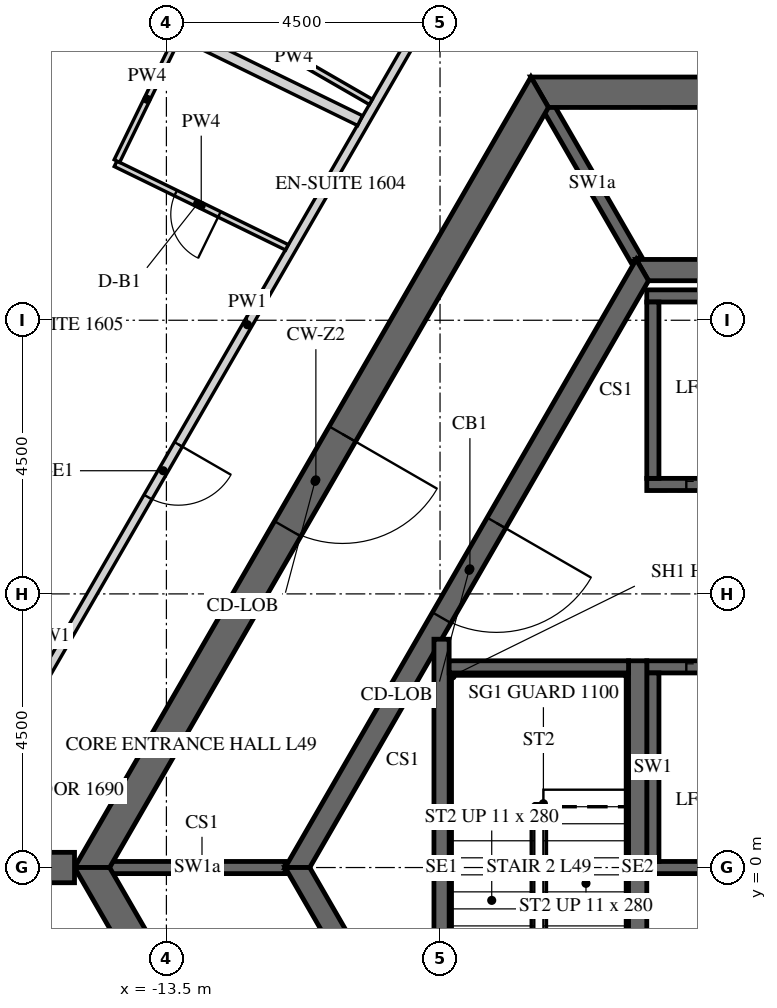
"""IFC4 building model, lengths in metres.
Left out: names, types, materials, properties, quantities, classifications, styles, units other than length and angle.
Written with IfcOpenShell. Run it as: python <this file> out.ifc"""

import sys

from ifc_helpers import new_model, si_unit, direction, frame, frame_2d, origin, place, context, subcontext, project, spatial, polyline, rectangle, outline, extrude, element, fill, save


model = new_model("IFC4")
c1 = context("Model", 3, precision=1e-05, world=origin(), true_north=direction((0.0, 1.0)))
c2 = subcontext(c1, "Body", "Model", "MODEL_VIEW")
j1 = project(units=[si_unit("LENGTHUNIT", "METRE"), si_unit("PLANEANGLEUNIT", "RADIAN")], contexts=[c1])
p1 = place(None, origin())
s1 = spatial("IfcSite", under=j1, at=p1, CompositionType="ELEMENT")
p2 = place(p1, origin())
s2 = spatial("IfcBuilding", under=s1, at=p2, CompositionType="ELEMENT")
p3 = place(p2, frame((0.0, 0.0, 207.3)))
s3 = spatial("IfcBuildingStorey", under=s2, at=p3, CompositionType="ELEMENT", Elevation=207.3)
p4 = place(p3, frame((-7.361, 12.75, -0.15), z_axis=(0.0, 0.0, 1.0), x_axis=(-0.50000571537, -0.866022103989, 0.0)))
e1 = element("IfcWall", 1, at=p4, inside=s3, PredefinedType="SHEAR", context=c2, shape_type="SweptSolid", body=[
    extrude(outline(polyline([(-0.144, -0.25), (14.867, -0.25), (14.578, 0.25), (0.144, 0.25), (-0.144, -0.25)])), origin(), (0.0, 0.0, 1.0), 3.9),
])
p5 = place(p4, frame((6.49, 0.0, 0.15)))
e2 = element("IfcOpeningElement", 2, at=p5, cuts=e1, PredefinedType="OPENING", context=c2, shape_type="SweptSolid", body=[
    extrude(rectangle(XDim=1.8, YDim=2.4, at=frame_2d((0.9, 1.2))), frame((0.0, 0.26, 0.0), z_axis=(0.0, -1.0, 0.0), x_axis=(1.0, 0.0, 0.0)), (0.0, 0.0, 1.0), 0.52),
])
p6 = place(p3, frame((-14.722, 0.0, -0.15), z_axis=(0.0, 0.0, 1.0), x_axis=(0.50000571537, -0.866022103989, 0.0)))
e3 = element("IfcWall", 3, at=p6, inside=s3, PredefinedType="SHEAR", context=c2, shape_type="SweptSolid", body=[
    extrude(outline(polyline([(-0.144, -0.25), (14.867, -0.25), (14.578, 0.25), (0.144, 0.25), (-0.144, -0.25)])), origin(), (0.0, 0.0, 1.0), 3.9),
])
p7 = place(p6, frame((6.432, 0.0, 0.15)))
e4 = element("IfcOpeningElement", 4, at=p7, cuts=e3, PredefinedType="OPENING", context=c2, shape_type="SweptSolid", body=[
    extrude(rectangle(XDim=1.8, YDim=2.4, at=frame_2d((0.9, 1.2))), frame((0.0, 0.26, 0.0), z_axis=(0.0, -1.0, 0.0), x_axis=(1.0, 0.0, 0.0)), (0.0, 0.0, 1.0), 0.52),
])
p8 = place(p3, frame((7.361, 12.75, -0.15), z_axis=(0.0, 0.0, 1.0), x_axis=(-1.0, 0.0, 0.0)))
e5 = element("IfcWall", 5, at=p8, inside=s3, PredefinedType="SHEAR", context=c2, shape_type="SweptSolid", body=[
    extrude(outline(polyline([(-0.144, -0.25), (14.866, -0.25), (14.578, 0.25), (0.144, 0.25), (-0.144, -0.25)])), origin(), (0.0, 0.0, 1.0), 3.9),
])
p9 = place(p8, frame((6.761, 0.0, 0.15)))
e6 = element("IfcOpeningElement", 6, at=p9, cuts=e5, PredefinedType="OPENING", context=c2, shape_type="SweptSolid", body=[
    extrude(rectangle(XDim=1.2, YDim=2.4, at=frame_2d((0.6, 1.2))), frame((0.0, 0.26, 0.0), z_axis=(0.0, -1.0, 0.0), x_axis=(1.0, 0.0, 0.0)), (0.0, 0.0, 1.0), 0.52),
])
p10 = place(p3, frame((-15.011, 0.0, -0.15), z_axis=(0.0, 0.0, 1.0), x_axis=(-1.0, 0.0, 0.0)))
e7 = element("IfcWall", 7, at=p10, inside=s3, PredefinedType="SHEAR", context=c2, shape_type="SweptSolid", body=[
    extrude(rectangle(XDim=15.424, YDim=0.5, at=frame_2d((7.712, 0.0))), origin(), (0.0, 0.0, 1.0), 3.9),
])
p11 = place(p10, frame((6.812, 0.0, 0.15)))
e8 = element("IfcOpeningElement", 8, at=p11, cuts=e7, PredefinedType="OPENING", context=c2, shape_type="SweptSolid", body=[
    extrude(rectangle(XDim=1.8, YDim=2.4, at=frame_2d((0.9, 1.2))), frame((0.0, 0.26, 0.0), z_axis=(0.0, -1.0, 0.0), x_axis=(1.0, 0.0, 0.0)), (0.0, 0.0, 1.0), 0.52),
])
p12 = place(p3, frame((-5.673, 9.825, -0.15), z_axis=(0.0, 0.0, 1.0), x_axis=(-0.499995046907, -0.866028263435, 0.0)))
e9 = element("IfcWall", 9, at=p12, inside=s3, PredefinedType="SHEAR", context=c2, shape_type="SweptSolid", body=[
    extrude(outline(polyline([(-0.101, -0.175), (11.446, -0.175), (11.244, 0.175), (0.101, 0.175), (-0.101, -0.175)])), origin(), (0.0, 0.0, 1.0), 3.9),
])
p13 = place(p12, frame((4.801, 0.0, 0.15)))
e10 = element("IfcOpeningElement", 10, at=p13, cuts=e9, PredefinedType="OPENING", context=c2, shape_type="SweptSolid", body=[
    extrude(rectangle(XDim=1.8, YDim=2.4, at=frame_2d((0.9, 1.2))), frame((0.0, 0.185, 0.0), z_axis=(0.0, -1.0, 0.0), x_axis=(1.0, 0.0, 0.0)), (0.0, 0.0, 1.0), 0.37),
])
p14 = place(p3, frame((-11.345, 0.0, -0.15), z_axis=(0.0, 0.0, 1.0), x_axis=(0.499995046907, -0.866028263435, 0.0)))
e11 = element("IfcWall", 11, at=p14, inside=s3, PredefinedType="SHEAR", context=c2, shape_type="SweptSolid", body=[
    extrude(outline(polyline([(-0.101, -0.175), (11.446, -0.175), (11.244, 0.175), (0.101, 0.175), (-0.101, -0.175)])), origin(), (0.0, 0.0, 1.0), 3.9),
])
p15 = place(p14, frame((4.744, 0.0, 0.15)))
e12 = element("IfcOpeningElement", 12, at=p15, cuts=e11, PredefinedType="OPENING", context=c2, shape_type="SweptSolid", body=[
    extrude(rectangle(XDim=1.8, YDim=2.4, at=frame_2d((0.9, 1.2))), frame((0.0, 0.185, 0.0), z_axis=(0.0, -1.0, 0.0), x_axis=(1.0, 0.0, 0.0)), (0.0, 0.0, 1.0), 0.37),
])
p16 = place(p3, frame((5.673, 9.825, -0.15), z_axis=(0.0, 0.0, 1.0), x_axis=(-1.0, 0.0, 0.0)))
e13 = element("IfcWall", 13, at=p16, inside=s3, PredefinedType="SHEAR", context=c2, shape_type="SweptSolid", body=[
    extrude(outline(polyline([(-0.101, -0.175), (11.446, -0.175), (11.244, 0.175), (0.101, 0.175), (-0.101, -0.175)])), origin(), (0.0, 0.0, 1.0), 3.9),
])
p17 = place(p3, frame((-5.6, 6.3, -0.25), z_axis=(0.0, 0.0, 1.0), x_axis=(1.0, 0.0, 0.0)))
e14 = element("IfcWall", 14, at=p17, inside=s3, PredefinedType="SHEAR", context=c2, shape_type="SweptSolid", body=[
    extrude(rectangle(XDim=11.2, YDim=0.2, at=frame_2d((5.6, 0.0))), origin(), (0.0, 0.0, 1.0), 3.9),
])
p18 = place(p17, frame((8.45, 0.0, 0.25)))
e15 = element("IfcOpeningElement", 15, at=p18, cuts=e14, PredefinedType="OPENING", context=c2, shape_type="SweptSolid", body=[
    extrude(rectangle(XDim=0.9, YDim=2.1, at=frame_2d((0.45, 1.05))), frame((0.0, 0.11, 0.0), z_axis=(0.0, -1.0, 0.0), x_axis=(1.0, 0.0, 0.0)), (0.0, 0.0, 1.0), 0.22),
])
p19 = place(p17, frame((0.65, 0.0, 0.25)))
e16 = element("IfcOpeningElement", 16, at=p19, cuts=e14, PredefinedType="OPENING", context=c2, shape_type="SweptSolid", body=[
    extrude(rectangle(XDim=1.1, YDim=2.1, at=frame_2d((0.55, 1.05))), frame((0.0, 0.11, 0.0), z_axis=(0.0, -1.0, 0.0), x_axis=(1.0, 0.0, 0.0)), (0.0, 0.0, 1.0), 0.22),
])
p20 = place(p17, frame((2.85, 0.0, 0.25)))
e17 = element("IfcOpeningElement", 17, at=p20, cuts=e14, PredefinedType="OPENING", context=c2, shape_type="SweptSolid", body=[
    extrude(rectangle(XDim=1.1, YDim=2.1, at=frame_2d((0.55, 1.05))), frame((0.0, 0.11, 0.0), z_axis=(0.0, -1.0, 0.0), x_axis=(1.0, 0.0, 0.0)), (0.0, 0.0, 1.0), 0.22),
])
p21 = place(p17, frame((5.05, 0.0, 0.25)))
e18 = element("IfcOpeningElement", 18, at=p21, cuts=e14, PredefinedType="OPENING", context=c2, shape_type="SweptSolid", body=[
    extrude(rectangle(XDim=1.1, YDim=2.1, at=frame_2d((0.55, 1.05))), frame((0.0, 0.11, 0.0), z_axis=(0.0, -1.0, 0.0), x_axis=(1.0, 0.0, 0.0)), (0.0, 0.0, 1.0), 0.22),
])
p22 = place(p3, frame((-5.6, 9.4, -0.25), z_axis=(0.0, 0.0, 1.0), x_axis=(1.0, 0.0, 0.0)))
e19 = element("IfcWall", 19, at=p22, inside=s3, PredefinedType="SHEAR", context=c2, shape_type="SweptSolid", body=[
    extrude(rectangle(XDim=11.2, YDim=0.2, at=frame_2d((5.6, 0.0))), origin(), (0.0, 0.0, 1.0), 3.9),
])
p23 = place(p3, frame((-5.5, 6.4, -0.25), z_axis=(0.0, 0.0, 1.0), x_axis=(0.0, 1.0, 0.0)))
e20 = element("IfcWall", 20, at=p23, inside=s3, PredefinedType="SHEAR", context=c2, shape_type="SweptSolid", body=[
    extrude(rectangle(XDim=2.9, YDim=0.2, at=frame_2d((1.45, 0.0))), origin(), (0.0, 0.0, 1.0), 3.9),
])
p24 = place(p3, frame((-5.6, 3.3, -0.25), z_axis=(0.0, 0.0, 1.0), x_axis=(1.0, 0.0, 0.0)))
e21 = element("IfcWall", 21, at=p24, inside=s3, PredefinedType="SHEAR", context=c2, shape_type="SweptSolid", body=[
    extrude(rectangle(XDim=11.2, YDim=0.2, at=frame_2d((5.6, 0.0))), origin(), (0.0, 0.0, 1.0), 3.9),
])
p25 = place(p24, frame((0.65, 0.0, 0.25)))
e22 = element("IfcOpeningElement", 22, at=p25, cuts=e21, PredefinedType="OPENING", context=c2, shape_type="SweptSolid", body=[
    extrude(rectangle(XDim=1.1, YDim=2.1, at=frame_2d((0.55, 1.05))), frame((0.0, 0.11, 0.0), z_axis=(0.0, -1.0, 0.0), x_axis=(1.0, 0.0, 0.0)), (0.0, 0.0, 1.0), 0.22),
])
p26 = place(p24, frame((2.85, 0.0, 0.25)))
e23 = element("IfcOpeningElement", 23, at=p26, cuts=e21, PredefinedType="OPENING", context=c2, shape_type="SweptSolid", body=[
    extrude(rectangle(XDim=1.1, YDim=2.1, at=frame_2d((0.55, 1.05))), frame((0.0, 0.11, 0.0), z_axis=(0.0, -1.0, 0.0), x_axis=(1.0, 0.0, 0.0)), (0.0, 0.0, 1.0), 0.22),
])
p27 = place(p24, frame((5.05, 0.0, 0.25)))
e24 = element("IfcOpeningElement", 24, at=p27, cuts=e21, PredefinedType="OPENING", context=c2, shape_type="SweptSolid", body=[
    extrude(rectangle(XDim=1.1, YDim=2.1, at=frame_2d((0.55, 1.05))), frame((0.0, 0.11, 0.0), z_axis=(0.0, -1.0, 0.0), x_axis=(1.0, 0.0, 0.0)), (0.0, 0.0, 1.0), 0.22),
])
p28 = place(p24, frame((7.25, 0.0, 0.25)))
e25 = element("IfcOpeningElement", 25, at=p28, cuts=e21, PredefinedType="OPENING", context=c2, shape_type="SweptSolid", body=[
    extrude(rectangle(XDim=1.1, YDim=2.1, at=frame_2d((0.55, 1.05))), frame((0.0, 0.11, 0.0), z_axis=(0.0, -1.0, 0.0), x_axis=(1.0, 0.0, 0.0)), (0.0, 0.0, 1.0), 0.22),
])
p29 = place(p24, frame((9.45, 0.0, 0.25)))
e26 = element("IfcOpeningElement", 26, at=p29, cuts=e21, PredefinedType="OPENING", context=c2, shape_type="SweptSolid", body=[
    extrude(rectangle(XDim=1.1, YDim=2.1, at=frame_2d((0.55, 1.05))), frame((0.0, 0.11, 0.0), z_axis=(0.0, -1.0, 0.0), x_axis=(1.0, 0.0, 0.0)), (0.0, 0.0, 1.0), 0.22),
])
p30 = place(p3, frame((-5.6, 0.0, -0.25), z_axis=(0.0, 0.0, 1.0), x_axis=(1.0, 0.0, 0.0)))
e27 = element("IfcWall", 27, at=p30, inside=s3, PredefinedType="SHEAR", context=c2, shape_type="SweptSolid", body=[
    extrude(rectangle(XDim=11.2, YDim=0.2, at=frame_2d((5.6, 0.0))), origin(), (0.0, 0.0, 1.0), 3.9),
])
p31 = place(p3, frame((-5.5, 0.1, -0.25), z_axis=(0.0, 0.0, 1.0), x_axis=(0.0, 1.0, 0.0)))
e28 = element("IfcWall", 28, at=p31, inside=s3, PredefinedType="SHEAR", context=c2, shape_type="SweptSolid", body=[
    extrude(rectangle(XDim=3.1, YDim=0.2, at=frame_2d((1.55, 0.0))), origin(), (0.0, 0.0, 1.0), 3.9),
])
for number, where, z_axis, x_axis in (
    (29, (-5.773, 10.0, -0.15), (0.0, 0.0, 1.0), (-0.5, 0.866, 0.0)),
    (30, (-11.547, 0.0, -0.15), (0.0, 0.0, 1.0), (-1.0, 0.0, 0.0)),
):
    element("IfcWall", number, at=place(p3, frame(where, z_axis=z_axis, x_axis=x_axis)), inside=s3, PredefinedType="SHEAR", context=c2, shape_type="SweptSolid", body=[
        extrude(rectangle(XDim=2.887, YDim=0.2, at=frame_2d((1.443, 0.0))), origin(), (0.0, 0.0, 1.0), 3.9),
    ])
p32 = place(p3, frame((-5.75, -3.4, -0.25), z_axis=(0.0, 0.0, 1.0), x_axis=(0.0, 1.0, 0.0)))
e31 = element("IfcWall", 31, at=p32, inside=s3, PredefinedType="SHEAR", context=c2, shape_type="SweptSolid", body=[
    extrude(rectangle(XDim=6.8, YDim=0.3, at=frame_2d((3.4, 0.0))), origin(), (0.0, 0.0, 1.0), 3.9),
])
p33 = place(p3, frame((-8.975, -3.755, -0.25), z_axis=(0.0, 0.0, 1.0), x_axis=(0.0, 1.0, 0.0)))
e32 = element("IfcWall", 32, at=p33, inside=s3, PredefinedType="SHEAR", context=c2, shape_type="SweptSolid", body=[
    extrude(rectangle(XDim=7.51, YDim=0.25, at=frame_2d((3.755, 0.0))), origin(), (0.0, 0.0, 1.0), 3.9),
])
p34 = place(p3, frame((-8.85, 3.3, -0.25), z_axis=(0.0, 0.0, 1.0), x_axis=(1.0, 0.0, 0.0)))
e33 = element("IfcWall", 33, at=p34, inside=s3, PredefinedType="SHEAR", context=c2, shape_type="SweptSolid", body=[
    extrude(rectangle(XDim=2.95, YDim=0.2, at=frame_2d((1.475, 0.0))), origin(), (0.0, 0.0, 1.0), 3.9),
])
p35 = place(p3, frame((-8.673, 14.978, 0.0), z_axis=(0.0, 0.0, 1.0), x_axis=(-0.500009245501, -0.866020065826, 0.0)))
e34 = element("IfcWall", 34, at=p35, inside=s3, PredefinedType="PARTITIONING", context=c2, shape_type="SweptSolid", body=[
    extrude(rectangle(XDim=13.976, YDim=0.15, at=frame_2d((6.988, 0.0))), origin(), (0.0, 0.0, 1.0), 2.988),
])
p36 = place(p35, frame((9.26, 0.0, 0.0)))
e35 = element("IfcOpeningElement", 35, at=p36, cuts=e34, PredefinedType="OPENING", context=c2, shape_type="SweptSolid", body=[
    extrude(rectangle(XDim=1.0, YDim=2.1, at=frame_2d((0.5, 1.05))), frame((0.0, 0.085, 0.0), z_axis=(0.0, -1.0, 0.0), x_axis=(1.0, 0.0, 0.0)), (0.0, 0.0, 1.0), 0.17),
])
p37 = place(p3, frame((-10.138, 12.591, 0.0), z_axis=(0.0, 0.0, 1.0), x_axis=(-0.866025730634, 0.499999433879, 0.0)))
e36 = element("IfcWall", 36, at=p37, inside=s3, PredefinedType="PARTITIONING", context=c2, shape_type="SweptSolid", body=[
    extrude(rectangle(XDim=2.925, YDim=0.1, at=frame_2d((1.462, 0.0))), origin(), (0.0, 0.0, 1.0), 2.988),
])
p38 = place(p3, frame((-21.815, 17.892, 0.0), z_axis=(0.0, 0.0, 1.0), x_axis=(0.898799253997, -0.438360469265, 0.0)))
e37 = element("IfcWall", 37, at=p38, inside=s3, PredefinedType="PARTITIONING", context=c2, shape_type="SweptSolid", body=[
    extrude(rectangle(XDim=12.794, YDim=0.18, at=frame_2d((6.397, 0.0))), origin(), (0.0, 0.0, 1.0), 2.988),
])
p39 = place(p3, frame((-11.518, 10.199, 0.0), z_axis=(0.0, 0.0, 1.0), x_axis=(-0.898776679215, 0.438406752799, 0.0)))
e38 = element("IfcWall", 38, at=p39, inside=s3, PredefinedType="PARTITIONING", context=c2, shape_type="SweptSolid", body=[
    extrude(rectangle(XDim=3.135, YDim=0.1, at=frame_2d((1.567, 0.0))), origin(), (0.0, 0.0, 1.0), 2.988),
])
p40 = place(p39, frame((1.235, 0.0, 0.0)))
e39 = element("IfcOpeningElement", 39, at=p40, cuts=e38, PredefinedType="OPENING", context=c2, shape_type="SweptSolid", body=[
    extrude(rectangle(XDim=0.8, YDim=2.1, at=frame_2d((0.4, 1.05))), frame((0.0, 0.06, 0.0), z_axis=(0.0, -1.0, 0.0), x_axis=(1.0, 0.0, 0.0)), (0.0, 0.0, 1.0), 0.12),
])
p41 = place(p3, frame((-14.314, 11.619, 0.0), z_axis=(0.0, 0.0, 1.0), x_axis=(0.438376807268, 0.898791285477, 0.0)))
e40 = element("IfcWall", 40, at=p41, inside=s3, PredefinedType="PARTITIONING", context=c2, shape_type="SweptSolid", body=[
    extrude(rectangle(XDim=2.26, YDim=0.1, at=frame_2d((1.13, 0.0))), origin(), (0.0, 0.0, 1.0), 2.988),
])
p42 = place(p5, origin())
e41 = element("IfcDoor", 41, at=p42, inside=s3, OperationType="DOUBLE_DOOR_SINGLE_SWING", PredefinedType="DOOR", context=c2, shape_type="SweptSolid", body=[
    extrude(rectangle(XDim=1.8, YDim=2.4, at=frame_2d((0.9, 1.2))), frame((0.0, 0.025, 0.0), z_axis=(0.0, -1.0, 0.0), x_axis=(1.0, 0.0, 0.0)), (0.0, 0.0, 1.0), 0.05),
])
fill(e2, e41)
p43 = place(p13, origin())
e42 = element("IfcDoor", 42, at=p43, inside=s3, OperationType="DOUBLE_DOOR_SINGLE_SWING", PredefinedType="DOOR", context=c2, shape_type="SweptSolid", body=[
    extrude(rectangle(XDim=1.8, YDim=2.4, at=frame_2d((0.9, 1.2))), frame((0.0, 0.025, 0.0), z_axis=(0.0, -1.0, 0.0), x_axis=(1.0, 0.0, 0.0)), (0.0, 0.0, 1.0), 0.05),
])
fill(e10, e42)
p44 = place(p19, origin())
e43 = element("IfcDoor", 43, at=p44, inside=s3, OperationType="SLIDING_TO_LEFT", PredefinedType="DOOR", context=c2, shape_type="SweptSolid", body=[
    extrude(rectangle(XDim=1.1, YDim=2.1, at=frame_2d((0.55, 1.05))), frame((0.0, 0.025, 0.0), z_axis=(0.0, -1.0, 0.0), x_axis=(1.0, 0.0, 0.0)), (0.0, 0.0, 1.0), 0.05),
])
fill(e16, e43)
p45 = place(p25, origin())
e44 = element("IfcDoor", 44, at=p45, inside=s3, OperationType="SLIDING_TO_LEFT", PredefinedType="DOOR", context=c2, shape_type="SweptSolid", body=[
    extrude(rectangle(XDim=1.1, YDim=2.1, at=frame_2d((0.55, 1.05))), frame((0.0, 0.025, 0.0), z_axis=(0.0, -1.0, 0.0), x_axis=(1.0, 0.0, 0.0)), (0.0, 0.0, 1.0), 0.05),
])
fill(e22, e44)
p46 = place(p36, origin())
e45 = element("IfcDoor", 45, at=p46, inside=s3, OperationType="SINGLE_SWING_RIGHT", PredefinedType="DOOR", context=c2, shape_type="SweptSolid", body=[
    extrude(rectangle(XDim=1.0, YDim=2.1, at=frame_2d((0.5, 1.05))), frame((0.0, 0.025, 0.0), z_axis=(0.0, -1.0, 0.0), x_axis=(1.0, 0.0, 0.0)), (0.0, 0.0, 1.0), 0.05),
])
fill(e35, e45)
p47 = place(p40, origin())
e46 = element("IfcDoor", 46, at=p47, inside=s3, OperationType="SINGLE_SWING_LEFT", PredefinedType="DOOR", context=c2, shape_type="SweptSolid", body=[
    extrude(rectangle(XDim=0.8, YDim=2.1, at=frame_2d((0.4, 1.05))), frame((0.0, 0.025, 0.0), z_axis=(0.0, -1.0, 0.0), x_axis=(1.0, 0.0, 0.0)), (0.0, 0.0, 1.0), 0.05),
])
fill(e39, e46)
save(model, sys.argv[1])
